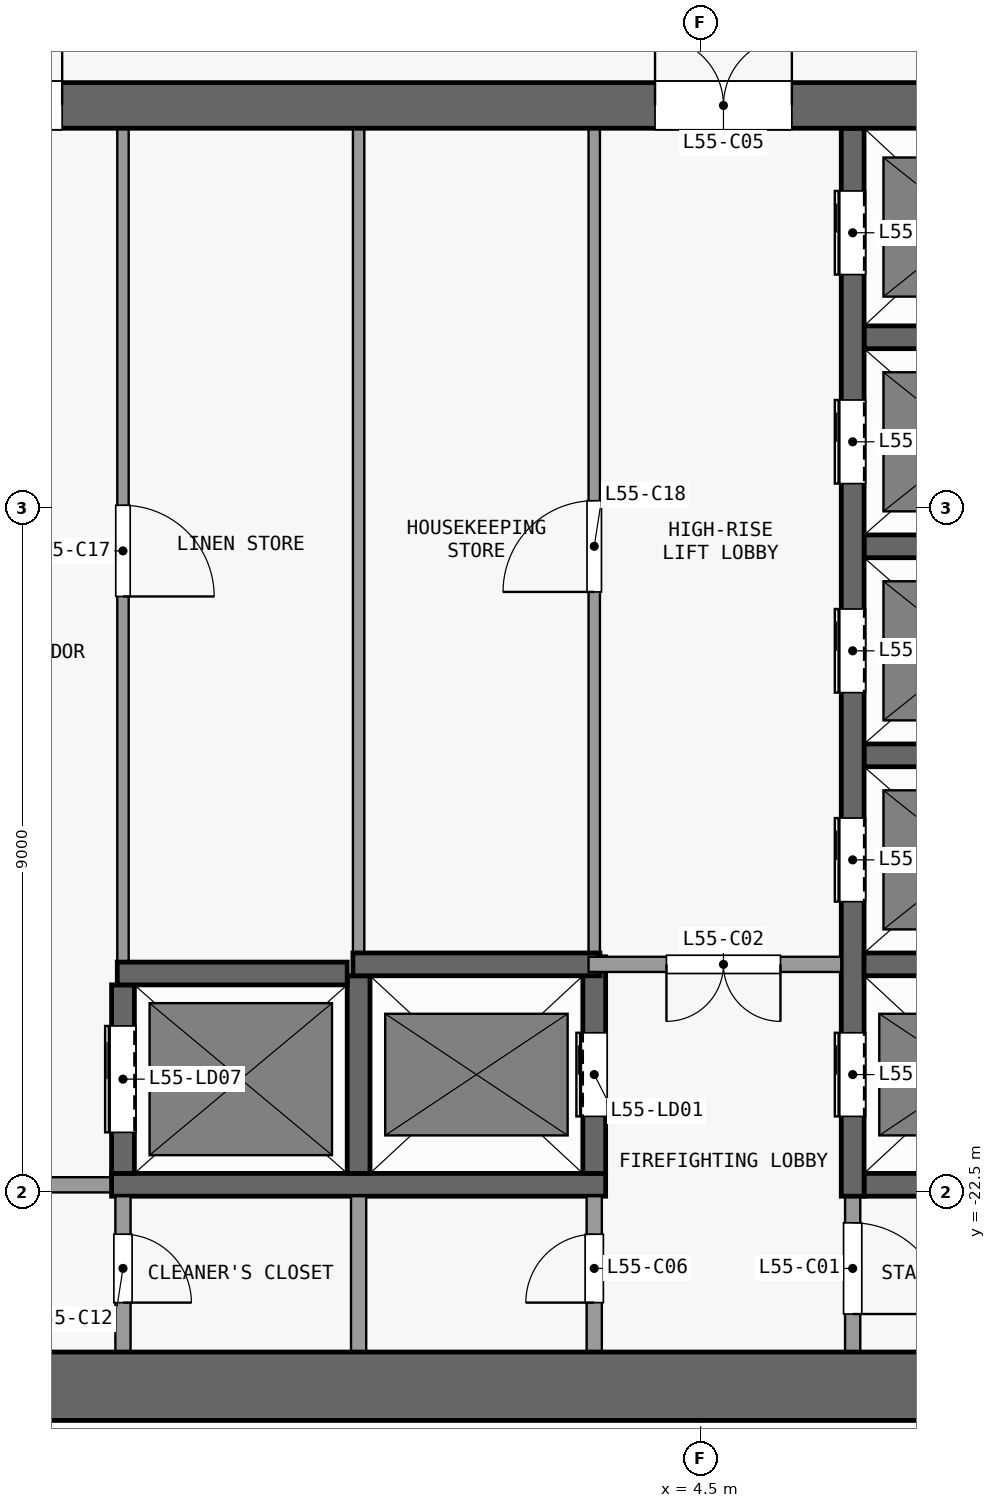
"""IFC4 building model, lengths in metres.
Left out: names, types, materials, properties, quantities, classifications, styles, units other than length and angle.
Written with IfcOpenShell. Run it as: python <this file> out.ifc"""

import sys

from ifc_helpers import new_model, si_unit, direction, frame, frame_2d, origin, place, context, subcontext, project, spatial, rectangle, extrude, element, fill, save


model = new_model("IFC4")
c1 = context("Model", 3, precision=1e-05, world=origin(), true_north=direction((0.0, 1.0)))
c2 = subcontext(c1, "Body", "Model", "MODEL_VIEW")
j1 = project(units=[si_unit("LENGTHUNIT", "METRE"), si_unit("PLANEANGLEUNIT", "RADIAN")], contexts=[c1])
p1 = place(None, origin())
s1 = spatial("IfcSite", under=j1, at=p1, CompositionType="ELEMENT")
p2 = place(p1, origin())
s2 = spatial("IfcBuilding", under=s1, at=p2, CompositionType="ELEMENT")
p3 = place(p2, frame((0.0, 0.0, 219.5)))
s3 = spatial("IfcBuildingStorey", under=s2, at=p3, CompositionType="ELEMENT", Elevation=219.5)
p4 = place(p3, frame((-13.2, -25.05, 0.0), z_axis=(0.0, 0.0, 1.0), x_axis=(1.0, 0.0, 0.0)))
e1 = element("IfcWall", 1, at=p4, inside=s3, PredefinedType="SHEAR", context=c2, shape_type="SweptSolid", body=[
    extrude(rectangle(XDim=26.4, YDim=0.9, at=frame_2d((13.2, 0.0))), origin(), (0.0, 0.0, 1.0), 3.3),
])
p5 = place(p3, frame((-13.2, -8.2, 0.0), z_axis=(0.0, 0.0, 1.0), x_axis=(1.0, 0.0, 0.0)))
e2 = element("IfcWall", 2, at=p5, inside=s3, PredefinedType="SHEAR", context=c2, shape_type="SweptSolid", body=[
    extrude(rectangle(XDim=26.4, YDim=0.6, at=frame_2d((13.2, 0.0))), origin(), (0.0, 0.0, 1.0), 3.3),
])
p6 = place(p5, frame((7.5, 0.0, 0.0)))
e3 = element("IfcOpeningElement", 3, at=p6, cuts=e2, PredefinedType="OPENING", context=c2, shape_type="SweptSolid", body=[
    extrude(rectangle(XDim=1.8, YDim=2.1, at=frame_2d((0.9, 1.05))), frame((0.0, 0.31, 0.0), z_axis=(0.0, -1.0, 0.0), x_axis=(1.0, 0.0, 0.0)), (0.0, 0.0, 1.0), 0.62),
])
p7 = place(p5, frame((17.1, 0.0, 0.0)))
e4 = element("IfcOpeningElement", 4, at=p7, cuts=e2, PredefinedType="OPENING", context=c2, shape_type="SweptSolid", body=[
    extrude(rectangle(XDim=1.8, YDim=2.1, at=frame_2d((0.9, 1.05))), frame((0.0, 0.31, 0.0), z_axis=(0.0, -1.0, 0.0), x_axis=(1.0, 0.0, 0.0)), (0.0, 0.0, 1.0), 0.62),
])
p8 = place(p5, frame((2.425, 0.0, 0.0)))
e5 = element("IfcOpeningElement", 5, at=p8, cuts=e2, PredefinedType="OPENING", context=c2, shape_type="SweptSolid", body=[
    extrude(rectangle(XDim=0.9, YDim=2.1, at=frame_2d((0.45, 1.05))), frame((0.0, 0.31, 0.0), z_axis=(0.0, -1.0, 0.0), x_axis=(1.0, 0.0, 0.0)), (0.0, 0.0, 1.0), 0.62),
])
p9 = place(p5, frame((23.075, 0.0, 0.0)))
e6 = element("IfcOpeningElement", 6, at=p9, cuts=e2, PredefinedType="OPENING", context=c2, shape_type="SweptSolid", body=[
    extrude(rectangle(XDim=0.9, YDim=2.1, at=frame_2d((0.45, 1.05))), frame((0.0, 0.31, 0.0), z_axis=(0.0, -1.0, 0.0), x_axis=(1.0, 0.0, 0.0)), (0.0, 0.0, 1.0), 0.62),
])
p10 = place(p3, frame((-3.25, -22.4, 0.0), z_axis=(0.0, 0.0, 1.0), x_axis=(-1.0, 0.0, 0.0)))
e7 = element("IfcWall", 7, at=p10, inside=s3, PredefinedType="PARTITIONING", context=c2, shape_type="SweptSolid", body=[
    extrude(rectangle(XDim=6.2, YDim=0.2, at=frame_2d((3.1, 0.0))), origin(), (0.0, 0.0, 1.0), 3.3),
])
p11 = place(p10, frame((0.8, 0.0, 0.0)))
e8 = element("IfcOpeningElement", 8, at=p11, cuts=e7, PredefinedType="OPENING", context=c2, shape_type="SweptSolid", body=[
    extrude(rectangle(XDim=1.5, YDim=2.1, at=frame_2d((0.75, 1.05))), frame((0.0, 0.11, 0.0), z_axis=(0.0, -1.0, 0.0), x_axis=(1.0, 0.0, 0.0)), (0.0, 0.0, 1.0), 0.22),
])
p12 = place(p3, frame((-3.25, -22.4, 0.0), z_axis=(0.0, 0.0, 1.0), x_axis=(1.0, 0.0, 0.0)))
e9 = element("IfcWall", 9, at=p12, inside=s3, PredefinedType="SHEAR", context=c2, shape_type="SweptSolid", body=[
    extrude(rectangle(XDim=6.5, YDim=0.3, at=frame_2d((3.25, 0.0))), origin(), (0.0, 0.0, 1.0), 3.3),
])
p13 = place(p3, frame((6.65, -22.4, 0.0), z_axis=(0.0, 0.0, 1.0), x_axis=(1.0, 0.0, 0.0)))
e10 = element("IfcWall", 10, at=p13, inside=s3, PredefinedType="SHEAR", context=c2, shape_type="SweptSolid", body=[
    extrude(rectangle(XDim=2.8, YDim=0.3, at=frame_2d((1.4, 0.0))), origin(), (0.0, 0.0, 1.0), 3.3),
])
p14 = place(p3, frame((-3.175, -19.62, 0.0), z_axis=(0.0, 0.0, 1.0), x_axis=(1.0, 0.0, 0.0)))
e11 = element("IfcWall", 11, at=p14, inside=s3, PredefinedType="SHEAR", context=c2, shape_type="SweptSolid", body=[
    extrude(rectangle(XDim=3.025, YDim=0.3, at=frame_2d((1.513, 0.0))), origin(), (0.0, 0.0, 1.0), 3.3),
])
p15 = place(p3, frame((-0.075, -19.5, 0.0), z_axis=(0.0, 0.0, 1.0), x_axis=(1.0, 0.0, 0.0)))
e12 = element("IfcWall", 12, at=p15, inside=s3, PredefinedType="SHEAR", context=c2, shape_type="SweptSolid", body=[
    extrude(rectangle(XDim=3.25, YDim=0.3, at=frame_2d((1.625, 0.0))), origin(), (0.0, 0.0, 1.0), 3.3),
])
p16 = place(p3, frame((6.35, -19.5, 0.0), z_axis=(0.0, 0.0, 1.0), x_axis=(-1.0, 0.0, 0.0)))
e13 = element("IfcWall", 13, at=p16, inside=s3, PredefinedType="PARTITIONING", context=c2, shape_type="SweptSolid", body=[
    extrude(rectangle(XDim=3.325, YDim=0.2, at=frame_2d((1.663, 0.0))), origin(), (0.0, 0.0, 1.0), 3.3),
])
p17 = place(p16, frame((0.8, 0.0, 0.0)))
e14 = element("IfcOpeningElement", 14, at=p17, cuts=e13, PredefinedType="OPENING", context=c2, shape_type="SweptSolid", body=[
    extrude(rectangle(XDim=1.5, YDim=2.1, at=frame_2d((0.75, 1.05))), frame((0.0, 0.11, 0.0), z_axis=(0.0, -1.0, 0.0), x_axis=(1.0, 0.0, 0.0)), (0.0, 0.0, 1.0), 0.22),
])
for number, where, z_axis, x_axis in (
    (15, (6.65, -19.5, 0.0), (0.0, 0.0, 1.0), (1.0, 0.0, 0.0)),
    (16, (6.65, -16.75, 0.0), (0.0, 0.0, 1.0), (1.0, 0.0, 0.0)),
    (17, (6.65, -14.0, 0.0), (0.0, 0.0, 1.0), (1.0, 0.0, 0.0)),
    (18, (6.65, -11.25, 0.0), (0.0, 0.0, 1.0), (1.0, 0.0, 0.0)),
):
    element("IfcWall", number, at=place(p3, frame(where, z_axis=z_axis, x_axis=x_axis)), inside=s3, PredefinedType="SHEAR", context=c2, shape_type="SweptSolid", body=[
        extrude(rectangle(XDim=2.8, YDim=0.3, at=frame_2d((1.4, 0.0))), origin(), (0.0, 0.0, 1.0), 3.3),
    ])
p18 = place(p3, frame((-3.1, -22.55, 0.0), z_axis=(0.0, 0.0, 1.0), x_axis=(0.0, -1.0, 0.0)))
e19 = element("IfcWall", 19, at=p18, inside=s3, PredefinedType="PARTITIONING", context=c2, shape_type="SweptSolid", body=[
    extrude(rectangle(XDim=2.05, YDim=0.2, at=frame_2d((1.025, 0.0))), origin(), (0.0, 0.0, 1.0), 3.3),
])
p19 = place(p18, frame((0.5, 0.0, 0.0)))
e20 = element("IfcOpeningElement", 20, at=p19, cuts=e19, PredefinedType="OPENING", context=c2, shape_type="SweptSolid", body=[
    extrude(rectangle(XDim=0.9, YDim=2.1, at=frame_2d((0.45, 1.05))), frame((0.0, 0.11, 0.0), z_axis=(0.0, -1.0, 0.0), x_axis=(1.0, 0.0, 0.0)), (0.0, 0.0, 1.0), 0.22),
])
p20 = place(p3, frame((-3.1, -22.25, 0.0), z_axis=(0.0, 0.0, 1.0), x_axis=(0.0, 1.0, 0.0)))
e21 = element("IfcWall", 21, at=p20, inside=s3, PredefinedType="SHEAR", context=c2, shape_type="SweptSolid", body=[
    extrude(rectangle(XDim=2.48, YDim=0.3, at=frame_2d((1.24, 0.0))), origin(), (0.0, 0.0, 1.0), 3.3),
])
p21 = place(p20, frame((0.54, 0.0, 0.0)))
e22 = element("IfcOpeningElement", 22, at=p21, cuts=e21, PredefinedType="OPENING", context=c2, shape_type="SweptSolid", body=[
    extrude(rectangle(XDim=1.4, YDim=2.1, at=frame_2d((0.7, 1.05))), frame((0.0, 0.16, 0.0), z_axis=(0.0, -1.0, 0.0), x_axis=(1.0, 0.0, 0.0)), (0.0, 0.0, 1.0), 0.32),
])
p22 = place(p3, frame((-3.1, -8.5, 0.0), z_axis=(0.0, 0.0, 1.0), x_axis=(0.0, -1.0, 0.0)))
e23 = element("IfcWall", 23, at=p22, inside=s3, PredefinedType="PARTITIONING", context=c2, shape_type="SweptSolid", body=[
    extrude(rectangle(XDim=10.97, YDim=0.15, at=frame_2d((5.485, 0.0))), origin(), (0.0, 0.0, 1.0), 3.3),
])
p23 = place(p22, frame((4.96, 0.0, 0.0)))
e24 = element("IfcOpeningElement", 24, at=p23, cuts=e23, PredefinedType="OPENING", context=c2, shape_type="SweptSolid", body=[
    extrude(rectangle(XDim=1.2, YDim=2.1, at=frame_2d((0.6, 1.05))), frame((0.0, 0.085, 0.0), z_axis=(0.0, -1.0, 0.0), x_axis=(1.0, 0.0, 0.0)), (0.0, 0.0, 1.0), 0.17),
])
p24 = place(p3, frame((0.0, -24.6, 0.0), z_axis=(0.0, 0.0, 1.0), x_axis=(0.0, 1.0, 0.0)))
e25 = element("IfcWall", 25, at=p24, inside=s3, PredefinedType="PARTITIONING", context=c2, shape_type="SweptSolid", body=[
    extrude(rectangle(XDim=2.05, YDim=0.2, at=frame_2d((1.025, 0.0))), origin(), (0.0, 0.0, 1.0), 3.3),
])
p25 = place(p3, frame((0.0, -22.25, 0.0), z_axis=(0.0, 0.0, 1.0), x_axis=(0.0, 1.0, 0.0)))
e26 = element("IfcWall", 26, at=p25, inside=s3, PredefinedType="SHEAR", context=c2, shape_type="SweptSolid", body=[
    extrude(rectangle(XDim=2.6, YDim=0.3, at=frame_2d((1.3, 0.0))), origin(), (0.0, 0.0, 1.0), 3.3),
])
p26 = place(p3, frame((0.0, -19.35, 0.0), z_axis=(0.0, 0.0, 1.0), x_axis=(0.0, 1.0, 0.0)))
e27 = element("IfcWall", 27, at=p26, inside=s3, PredefinedType="PARTITIONING", context=c2, shape_type="SweptSolid", body=[
    extrude(rectangle(XDim=10.85, YDim=0.15, at=frame_2d((5.425, 0.0))), origin(), (0.0, 0.0, 1.0), 3.3),
])
p27 = place(p3, frame((3.1, -24.6, 0.0), z_axis=(0.0, 0.0, 1.0), x_axis=(0.0, 1.0, 0.0)))
e28 = element("IfcWall", 28, at=p27, inside=s3, PredefinedType="PARTITIONING", context=c2, shape_type="SweptSolid", body=[
    extrude(rectangle(XDim=2.05, YDim=0.2, at=frame_2d((1.025, 0.0))), origin(), (0.0, 0.0, 1.0), 3.3),
])
p28 = place(p27, frame((0.65, 0.0, 0.0)))
e29 = element("IfcOpeningElement", 29, at=p28, cuts=e28, PredefinedType="OPENING", context=c2, shape_type="SweptSolid", body=[
    extrude(rectangle(XDim=0.9, YDim=2.1, at=frame_2d((0.45, 1.05))), frame((0.0, 0.11, 0.0), z_axis=(0.0, -1.0, 0.0), x_axis=(1.0, 0.0, 0.0)), (0.0, 0.0, 1.0), 0.22),
])
p29 = place(p3, frame((3.1, -22.25, 0.0), z_axis=(0.0, 0.0, 1.0), x_axis=(0.0, 1.0, 0.0)))
e30 = element("IfcWall", 30, at=p29, inside=s3, PredefinedType="SHEAR", context=c2, shape_type="SweptSolid", body=[
    extrude(rectangle(XDim=2.85, YDim=0.3, at=frame_2d((1.425, 0.0))), origin(), (0.0, 0.0, 1.0), 3.3),
])
p30 = place(p29, frame((0.75, 0.0, 0.0)))
e31 = element("IfcOpeningElement", 31, at=p30, cuts=e30, PredefinedType="OPENING", context=c2, shape_type="SweptSolid", body=[
    extrude(rectangle(XDim=1.1, YDim=2.1, at=frame_2d((0.55, 1.05))), frame((0.0, 0.16, 0.0), z_axis=(0.0, -1.0, 0.0), x_axis=(1.0, 0.0, 0.0)), (0.0, 0.0, 1.0), 0.32),
])
p31 = place(p3, frame((3.1, -19.4, 0.0), z_axis=(0.0, 0.0, 1.0), x_axis=(0.0, 1.0, 0.0)))
e32 = element("IfcWall", 32, at=p31, inside=s3, PredefinedType="PARTITIONING", context=c2, shape_type="SweptSolid", body=[
    extrude(rectangle(XDim=10.9, YDim=0.15, at=frame_2d((5.45, 0.0))), origin(), (0.0, 0.0, 1.0), 3.3),
])
p32 = place(p31, frame((4.8, 0.0, 0.0)))
e33 = element("IfcOpeningElement", 33, at=p32, cuts=e32, PredefinedType="OPENING", context=c2, shape_type="SweptSolid", body=[
    extrude(rectangle(XDim=1.2, YDim=2.1, at=frame_2d((0.6, 1.05))), frame((0.0, 0.085, 0.0), z_axis=(0.0, -1.0, 0.0), x_axis=(1.0, 0.0, 0.0)), (0.0, 0.0, 1.0), 0.17),
])
p33 = place(p3, frame((6.5, -22.55, 0.0), z_axis=(0.0, 0.0, 1.0), x_axis=(0.0, -1.0, 0.0)))
e34 = element("IfcWall", 34, at=p33, inside=s3, PredefinedType="PARTITIONING", context=c2, shape_type="SweptSolid", body=[
    extrude(rectangle(XDim=2.05, YDim=0.2, at=frame_2d((1.025, 0.0))), origin(), (0.0, 0.0, 1.0), 3.3),
])
p34 = place(p33, frame((0.35, 0.0, 0.0)))
e35 = element("IfcOpeningElement", 35, at=p34, cuts=e34, PredefinedType="OPENING", context=c2, shape_type="SweptSolid", body=[
    extrude(rectangle(XDim=1.2, YDim=2.1, at=frame_2d((0.6, 1.05))), frame((0.0, 0.11, 0.0), z_axis=(0.0, -1.0, 0.0), x_axis=(1.0, 0.0, 0.0)), (0.0, 0.0, 1.0), 0.22),
])
p35 = place(p3, frame((6.5, -22.55, 0.0), z_axis=(0.0, 0.0, 1.0), x_axis=(0.0, 1.0, 0.0)))
e36 = element("IfcWall", 36, at=p35, inside=s3, PredefinedType="SHEAR", context=c2, shape_type="SweptSolid", body=[
    extrude(rectangle(XDim=14.05, YDim=0.3, at=frame_2d((7.025, 0.0))), origin(), (0.0, 0.0, 1.0), 3.3),
])
p36 = place(p35, frame((1.05, 0.0, 0.0)))
e37 = element("IfcOpeningElement", 37, at=p36, cuts=e36, PredefinedType="OPENING", context=c2, shape_type="SweptSolid", body=[
    extrude(rectangle(XDim=1.1, YDim=2.1, at=frame_2d((0.55, 1.05))), frame((0.0, 0.16, 0.0), z_axis=(0.0, -1.0, 0.0), x_axis=(1.0, 0.0, 0.0)), (0.0, 0.0, 1.0), 0.32),
])
p37 = place(p35, frame((3.875, 0.0, 0.0)))
e38 = element("IfcOpeningElement", 38, at=p37, cuts=e36, PredefinedType="OPENING", context=c2, shape_type="SweptSolid", body=[
    extrude(rectangle(XDim=1.1, YDim=2.1, at=frame_2d((0.55, 1.05))), frame((0.0, 0.16, 0.0), z_axis=(0.0, -1.0, 0.0), x_axis=(1.0, 0.0, 0.0)), (0.0, 0.0, 1.0), 0.32),
])
p38 = place(p35, frame((6.625, 0.0, 0.0)))
e39 = element("IfcOpeningElement", 39, at=p38, cuts=e36, PredefinedType="OPENING", context=c2, shape_type="SweptSolid", body=[
    extrude(rectangle(XDim=1.1, YDim=2.1, at=frame_2d((0.55, 1.05))), frame((0.0, 0.16, 0.0), z_axis=(0.0, -1.0, 0.0), x_axis=(1.0, 0.0, 0.0)), (0.0, 0.0, 1.0), 0.32),
])
p39 = place(p35, frame((9.375, 0.0, 0.0)))
e40 = element("IfcOpeningElement", 40, at=p39, cuts=e36, PredefinedType="OPENING", context=c2, shape_type="SweptSolid", body=[
    extrude(rectangle(XDim=1.1, YDim=2.1, at=frame_2d((0.55, 1.05))), frame((0.0, 0.16, 0.0), z_axis=(0.0, -1.0, 0.0), x_axis=(1.0, 0.0, 0.0)), (0.0, 0.0, 1.0), 0.32),
])
p40 = place(p35, frame((12.125, 0.0, 0.0)))
e41 = element("IfcOpeningElement", 41, at=p40, cuts=e36, PredefinedType="OPENING", context=c2, shape_type="SweptSolid", body=[
    extrude(rectangle(XDim=1.1, YDim=2.1, at=frame_2d((0.55, 1.05))), frame((0.0, 0.16, 0.0), z_axis=(0.0, -1.0, 0.0), x_axis=(1.0, 0.0, 0.0)), (0.0, 0.0, 1.0), 0.32),
])
p41 = place(p30, origin())
e42 = element("IfcDoor", 42, at=p41, inside=s3, OperationType="DOUBLE_DOOR_SLIDING", PredefinedType="DOOR", context=c2, shape_type="SweptSolid", body=[
    extrude(rectangle(XDim=1.1, YDim=2.1, at=frame_2d((0.55, 1.05))), frame((0.0, 0.025, 0.0), z_axis=(0.0, -1.0, 0.0), x_axis=(1.0, 0.0, 0.0)), (0.0, 0.0, 1.0), 0.05),
])
fill(e31, e42)
p42 = place(p36, origin())
e43 = element("IfcDoor", 43, at=p42, inside=s3, OperationType="DOUBLE_DOOR_SLIDING", PredefinedType="DOOR", context=c2, shape_type="SweptSolid", body=[
    extrude(rectangle(XDim=1.1, YDim=2.1, at=frame_2d((0.55, 1.05))), frame((0.0, 0.025, 0.0), z_axis=(0.0, -1.0, 0.0), x_axis=(1.0, 0.0, 0.0)), (0.0, 0.0, 1.0), 0.05),
])
fill(e37, e43)
p43 = place(p37, origin())
e44 = element("IfcDoor", 44, at=p43, inside=s3, OperationType="DOUBLE_DOOR_SLIDING", PredefinedType="DOOR", context=c2, shape_type="SweptSolid", body=[
    extrude(rectangle(XDim=1.1, YDim=2.1, at=frame_2d((0.55, 1.05))), frame((0.0, 0.025, 0.0), z_axis=(0.0, -1.0, 0.0), x_axis=(1.0, 0.0, 0.0)), (0.0, 0.0, 1.0), 0.05),
])
fill(e38, e44)
p44 = place(p38, origin())
e45 = element("IfcDoor", 45, at=p44, inside=s3, OperationType="DOUBLE_DOOR_SLIDING", PredefinedType="DOOR", context=c2, shape_type="SweptSolid", body=[
    extrude(rectangle(XDim=1.1, YDim=2.1, at=frame_2d((0.55, 1.05))), frame((0.0, 0.025, 0.0), z_axis=(0.0, -1.0, 0.0), x_axis=(1.0, 0.0, 0.0)), (0.0, 0.0, 1.0), 0.05),
])
fill(e39, e45)
p45 = place(p39, origin())
e46 = element("IfcDoor", 46, at=p45, inside=s3, OperationType="DOUBLE_DOOR_SLIDING", PredefinedType="DOOR", context=c2, shape_type="SweptSolid", body=[
    extrude(rectangle(XDim=1.1, YDim=2.1, at=frame_2d((0.55, 1.05))), frame((0.0, 0.025, 0.0), z_axis=(0.0, -1.0, 0.0), x_axis=(1.0, 0.0, 0.0)), (0.0, 0.0, 1.0), 0.05),
])
fill(e40, e46)
p46 = place(p40, origin())
e47 = element("IfcDoor", 47, at=p46, inside=s3, OperationType="DOUBLE_DOOR_SLIDING", PredefinedType="DOOR", context=c2, shape_type="SweptSolid", body=[
    extrude(rectangle(XDim=1.1, YDim=2.1, at=frame_2d((0.55, 1.05))), frame((0.0, 0.025, 0.0), z_axis=(0.0, -1.0, 0.0), x_axis=(1.0, 0.0, 0.0)), (0.0, 0.0, 1.0), 0.05),
])
fill(e41, e47)
p47 = place(p21, origin())
e48 = element("IfcDoor", 48, at=p47, inside=s3, OperationType="DOUBLE_DOOR_SLIDING", PredefinedType="DOOR", context=c2, shape_type="SweptSolid", body=[
    extrude(rectangle(XDim=1.4, YDim=2.1, at=frame_2d((0.7, 1.05))), frame((0.0, 0.025, 0.0), z_axis=(0.0, -1.0, 0.0), x_axis=(1.0, 0.0, 0.0)), (0.0, 0.0, 1.0), 0.05),
])
fill(e22, e48)
p48 = place(p34, origin())
e49 = element("IfcDoor", 49, at=p48, inside=s3, OperationType="SINGLE_SWING_RIGHT", PredefinedType="DOOR", context=c2, shape_type="SweptSolid", body=[
    extrude(rectangle(XDim=1.2, YDim=2.1, at=frame_2d((0.6, 1.05))), frame((0.0, 0.025, 0.0), z_axis=(0.0, -1.0, 0.0), x_axis=(1.0, 0.0, 0.0)), (0.0, 0.0, 1.0), 0.05),
])
fill(e35, e49)
p49 = place(p17, origin())
e50 = element("IfcDoor", 50, at=p49, inside=s3, OperationType="DOUBLE_DOOR_SINGLE_SWING", PredefinedType="DOOR", context=c2, shape_type="SweptSolid", body=[
    extrude(rectangle(XDim=1.5, YDim=2.1, at=frame_2d((0.75, 1.05))), frame((0.0, 0.025, 0.0), z_axis=(0.0, -1.0, 0.0), x_axis=(1.0, 0.0, 0.0)), (0.0, 0.0, 1.0), 0.05),
])
fill(e14, e50)
p50 = place(p6, origin())
e51 = element("IfcDoor", 51, at=p50, inside=s3, OperationType="DOUBLE_DOOR_SINGLE_SWING", PredefinedType="DOOR", context=c2, shape_type="SweptSolid", body=[
    extrude(rectangle(XDim=1.8, YDim=2.1, at=frame_2d((0.9, 1.05))), frame((0.0, 0.025, 0.0), z_axis=(0.0, -1.0, 0.0), x_axis=(1.0, 0.0, 0.0)), (0.0, 0.0, 1.0), 0.05),
])
fill(e3, e51)
p51 = place(p7, origin())
e52 = element("IfcDoor", 52, at=p51, inside=s3, OperationType="DOUBLE_DOOR_SINGLE_SWING", PredefinedType="DOOR", context=c2, shape_type="SweptSolid", body=[
    extrude(rectangle(XDim=1.8, YDim=2.1, at=frame_2d((0.9, 1.05))), frame((0.0, 0.025, 0.0), z_axis=(0.0, -1.0, 0.0), x_axis=(1.0, 0.0, 0.0)), (0.0, 0.0, 1.0), 0.05),
])
fill(e4, e52)
p52 = place(p28, origin())
e53 = element("IfcDoor", 53, at=p52, inside=s3, OperationType="SINGLE_SWING_LEFT", PredefinedType="DOOR", context=c2, shape_type="SweptSolid", body=[
    extrude(rectangle(XDim=0.9, YDim=2.1, at=frame_2d((0.45, 1.05))), frame((0.0, 0.025, 0.0), z_axis=(0.0, -1.0, 0.0), x_axis=(1.0, 0.0, 0.0)), (0.0, 0.0, 1.0), 0.05),
])
fill(e29, e53)
p53 = place(p19, origin())
e54 = element("IfcDoor", 54, at=p53, inside=s3, OperationType="SINGLE_SWING_RIGHT", PredefinedType="DOOR", context=c2, shape_type="SweptSolid", body=[
    extrude(rectangle(XDim=0.9, YDim=2.1, at=frame_2d((0.45, 1.05))), frame((0.0, 0.025, 0.0), z_axis=(0.0, -1.0, 0.0), x_axis=(1.0, 0.0, 0.0)), (0.0, 0.0, 1.0), 0.05),
])
fill(e20, e54)
p54 = place(p23, origin())
e55 = element("IfcDoor", 55, at=p54, inside=s3, OperationType="SINGLE_SWING_RIGHT", PredefinedType="DOOR", context=c2, shape_type="SweptSolid", body=[
    extrude(rectangle(XDim=1.2, YDim=2.1, at=frame_2d((0.6, 1.05))), frame((0.0, 0.025, 0.0), z_axis=(0.0, -1.0, 0.0), x_axis=(1.0, 0.0, 0.0)), (0.0, 0.0, 1.0), 0.05),
])
fill(e24, e55)
p55 = place(p32, origin())
e56 = element("IfcDoor", 56, at=p55, inside=s3, OperationType="SINGLE_SWING_LEFT", PredefinedType="DOOR", context=c2, shape_type="SweptSolid", body=[
    extrude(rectangle(XDim=1.2, YDim=2.1, at=frame_2d((0.6, 1.05))), frame((0.0, 0.025, 0.0), z_axis=(0.0, -1.0, 0.0), x_axis=(1.0, 0.0, 0.0)), (0.0, 0.0, 1.0), 0.05),
])
fill(e33, e56)
save(model, sys.argv[1])
